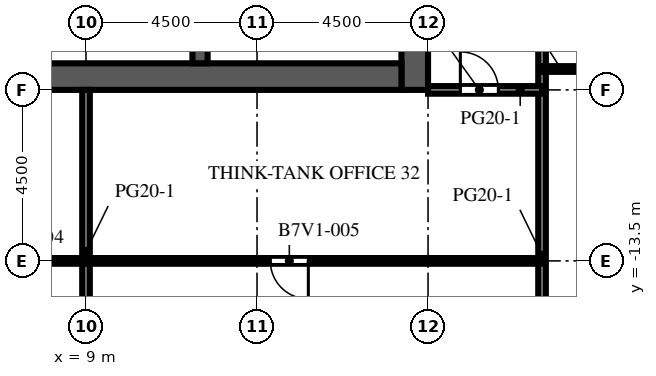
"""IFC4 building model, lengths in metres.
Left out: names, types, materials, properties, quantities, classifications, styles, units other than length and angle.
Written with IfcOpenShell. Run it as: python <this file> out.ifc"""

import sys

from ifc_helpers import new_model, si_unit, direction, frame, frame_2d, origin, place, context, subcontext, project, spatial, rectangle, extrude, element, fill, save


model = new_model("IFC4")
c1 = context("Model", 3, precision=1e-05, world=origin(), true_north=direction((0.0, 1.0)))
c2 = subcontext(c1, "Body", "Model", "MODEL_VIEW")
j1 = project(units=[si_unit("LENGTHUNIT", "METRE"), si_unit("PLANEANGLEUNIT", "RADIAN")], contexts=[c1])
p1 = place(None, origin())
s1 = spatial("IfcSite", under=j1, at=p1, CompositionType="ELEMENT")
p2 = place(p1, origin())
s2 = spatial("IfcBuilding", under=s1, at=p2, CompositionType="ELEMENT")
p3 = place(p2, frame((0.0, 0.0, 243.9)))
s3 = spatial("IfcBuildingStorey", under=s2, at=p3, CompositionType="ELEMENT", Elevation=243.9)
p4 = place(p3, frame((17.65, -9.0, 0.0), z_axis=(0.0, 0.0, 1.0), x_axis=(0.0, 1.0, 0.0)))
e1 = element("IfcWall", 1, at=p4, inside=s3, PredefinedType="SHEAR", context=c2, shape_type="SweptSolid", body=[
    extrude(rectangle(XDim=27.5, YDim=0.7, at=frame_2d((13.75, 0.0))), origin(), (0.0, 0.0, 1.0), 4.1),
])
p5 = place(p4, frame((12.55, 0.0, 0.0)))
e2 = element("IfcOpeningElement", 2, at=p5, cuts=e1, PredefinedType="OPENING", context=c2, shape_type="SweptSolid", body=[
    extrude(rectangle(XDim=2.4, YDim=2.4, at=frame_2d((1.2, 1.2))), frame((0.0, 0.36, 0.0), z_axis=(0.0, -1.0, 0.0), x_axis=(1.0, 0.0, 0.0)), (0.0, 0.0, 1.0), 0.72),
])
p6 = place(p4, frame((6.825, 0.0, 0.0)))
e3 = element("IfcOpeningElement", 3, at=p6, cuts=e1, PredefinedType="OPENING", context=c2, shape_type="SweptSolid", body=[
    extrude(rectangle(XDim=1.2, YDim=2.1, at=frame_2d((0.6, 1.05))), frame((0.0, 0.36, 0.0), z_axis=(0.0, -1.0, 0.0), x_axis=(1.0, 0.0, 0.0)), (0.0, 0.0, 1.0), 0.72),
])
p7 = place(p4, frame((19.475, 0.0, 0.0)))
e4 = element("IfcOpeningElement", 4, at=p7, cuts=e1, PredefinedType="OPENING", context=c2, shape_type="SweptSolid", body=[
    extrude(rectangle(XDim=1.2, YDim=2.1, at=frame_2d((0.6, 1.05))), frame((0.0, 0.36, 0.0), z_axis=(0.0, -1.0, 0.0), x_axis=(1.0, 0.0, 0.0)), (0.0, 0.0, 1.0), 0.72),
])
p8 = place(p3, frame((6.7, -8.65, 0.0), z_axis=(0.0, 0.0, 1.0), x_axis=(1.0, 0.0, 0.0)))
e5 = element("IfcWall", 5, at=p8, inside=s3, PredefinedType="SHEAR", context=c2, shape_type="SweptSolid", body=[
    extrude(rectangle(XDim=10.6, YDim=0.7, at=frame_2d((5.3, 0.0))), origin(), (0.0, 0.0, 1.0), 4.1),
])
p9 = place(p3, frame((12.0, -8.3, 0.0), z_axis=(0.0, 0.0, 1.0), x_axis=(0.0, 1.0, 0.0)))
e6 = element("IfcWall", 6, at=p9, inside=s3, PredefinedType="SHEAR", context=c2, shape_type="SweptSolid", body=[
    extrude(rectangle(XDim=7.6, YDim=0.4, at=frame_2d((3.8, 0.0))), origin(), (0.0, 0.0, 1.0), 4.1),
])
p10 = place(p3, frame((8.2, -8.3, 0.0), z_axis=(0.0, 0.0, 1.0), x_axis=(0.0, 1.0, 0.0)))
e7 = element("IfcWall", 7, at=p10, inside=s3, PredefinedType="PARTITIONING", context=c2, shape_type="SweptSolid", body=[
    extrude(rectangle(XDim=2.584, YDim=0.1, at=frame_2d((1.292, 0.0))), origin(), (0.0, 0.0, 1.0), 3.65),
])
p11 = place(p10, frame((0.792, 0.0, 0.0)))
e8 = element("IfcOpeningElement", 8, at=p11, cuts=e7, PredefinedType="OPENING", context=c2, shape_type="SweptSolid", body=[
    extrude(rectangle(XDim=1.0, YDim=2.1, at=frame_2d((0.5, 1.05))), frame((0.0, 0.06, 0.0), z_axis=(0.0, -1.0, 0.0), x_axis=(1.0, 0.0, 0.0)), (0.0, 0.0, 1.0), 0.12),
])
p12 = place(p3, frame((9.0, -17.5, 0.0), z_axis=(0.0, 0.0, 1.0), x_axis=(0.0, 1.0, 0.0)))
e9 = element("IfcWall", 9, at=p12, inside=s3, PredefinedType="PARTITIONING", context=c2, shape_type="SweptSolid", body=[
    extrude(rectangle(XDim=8.5, YDim=0.2, at=frame_2d((4.25, 0.0))), origin(), (0.0, 0.0, 1.0), 3.65),
])
p13 = place(p3, frame((21.0, 3.25, 0.0), z_axis=(0.0, 0.0, 1.0), x_axis=(0.0, -1.0, 0.0)))
e10 = element("IfcWall", 10, at=p13, inside=s3, PredefinedType="PARTITIONING", context=c2, shape_type="SweptSolid", body=[
    extrude(rectangle(XDim=25.6, YDim=0.2, at=frame_2d((12.8, 0.0))), origin(), (0.0, 0.0, 1.0), 3.65),
])
p14 = place(p13, frame((6.6, 0.0, 0.0)))
e11 = element("IfcOpeningElement", 11, at=p14, cuts=e10, PredefinedType="OPENING", context=c2, shape_type="SweptSolid", body=[
    extrude(rectangle(XDim=1.0, YDim=2.1, at=frame_2d((0.5, 1.05))), frame((0.0, 0.11, 0.0), z_axis=(0.0, -1.0, 0.0), x_axis=(1.0, 0.0, 0.0)), (0.0, 0.0, 1.0), 0.22),
])
p15 = place(p3, frame((21.0, -13.5, 0.0), z_axis=(0.0, 0.0, 1.0), x_axis=(-1.0, 0.0, 0.0)))
e12 = element("IfcWall", 12, at=p15, inside=s3, PredefinedType="PARTITIONING", context=c2, shape_type="SweptSolid", body=[
    extrude(rectangle(XDim=34.5, YDim=0.15, at=frame_2d((17.25, 0.0))), origin(), (0.0, 0.0, 1.0), 3.65),
])
p16 = place(p15, frame((31.65, 0.0, 0.0)))
e13 = element("IfcOpeningElement", 13, at=p16, cuts=e12, PredefinedType="OPENING", context=c2, shape_type="SweptSolid", body=[
    extrude(rectangle(XDim=1.0, YDim=2.1, at=frame_2d((0.5, 1.05))), frame((0.0, 0.085, 0.0), z_axis=(0.0, -1.0, 0.0), x_axis=(1.0, 0.0, 0.0)), (0.0, 0.0, 1.0), 0.17),
])
p17 = place(p15, frame((22.15, 0.0, 0.0)))
e14 = element("IfcOpeningElement", 14, at=p17, cuts=e12, PredefinedType="OPENING", context=c2, shape_type="SweptSolid", body=[
    extrude(rectangle(XDim=1.0, YDim=2.1, at=frame_2d((0.5, 1.05))), frame((0.0, 0.085, 0.0), z_axis=(0.0, -1.0, 0.0), x_axis=(1.0, 0.0, 0.0)), (0.0, 0.0, 1.0), 0.17),
])
p18 = place(p15, frame((13.15, 0.0, 0.0)))
e15 = element("IfcOpeningElement", 15, at=p18, cuts=e12, PredefinedType="OPENING", context=c2, shape_type="SweptSolid", body=[
    extrude(rectangle(XDim=1.0, YDim=2.1, at=frame_2d((0.5, 1.05))), frame((0.0, 0.085, 0.0), z_axis=(0.0, -1.0, 0.0), x_axis=(1.0, 0.0, 0.0)), (0.0, 0.0, 1.0), 0.17),
])
p19 = place(p15, frame((6.15, 0.0, 0.0)))
e16 = element("IfcOpeningElement", 16, at=p19, cuts=e12, PredefinedType="OPENING", context=c2, shape_type="SweptSolid", body=[
    extrude(rectangle(XDim=1.0, YDim=2.1, at=frame_2d((0.5, 1.05))), frame((0.0, 0.085, 0.0), z_axis=(0.0, -1.0, 0.0), x_axis=(1.0, 0.0, 0.0)), (0.0, 0.0, 1.0), 0.17),
])
p20 = place(p3, frame((21.0, -9.0, 0.0), z_axis=(0.0, 0.0, 1.0), x_axis=(-1.0, 0.0, 0.0)))
e17 = element("IfcWall", 17, at=p20, inside=s3, PredefinedType="PARTITIONING", context=c2, shape_type="SweptSolid", body=[
    extrude(rectangle(XDim=3.0, YDim=0.2, at=frame_2d((1.5, 0.0))), origin(), (0.0, 0.0, 1.0), 3.65),
])
p21 = place(p20, frame((1.15, 0.0, 0.0)))
e18 = element("IfcOpeningElement", 18, at=p21, cuts=e17, PredefinedType="OPENING", context=c2, shape_type="SweptSolid", body=[
    extrude(rectangle(XDim=1.0, YDim=2.1, at=frame_2d((0.5, 1.05))), frame((0.0, 0.11, 0.0), z_axis=(0.0, -1.0, 0.0), x_axis=(1.0, 0.0, 0.0)), (0.0, 0.0, 1.0), 0.22),
])
p22 = place(p3, frame((21.0, -8.45, 0.0), z_axis=(0.0, 0.0, 1.0), x_axis=(1.0, 0.0, 0.0)))
e19 = element("IfcWall", 19, at=p22, inside=s3, PredefinedType="PARTITIONING", context=c2, shape_type="SweptSolid", body=[
    extrude(rectangle(XDim=1.0, YDim=0.15, at=frame_2d((0.5, 0.0))), origin(), (0.0, 0.0, 1.0), 3.65),
])
p23 = place(p19, origin())
e20 = element("IfcDoor", 20, at=p23, inside=s3, OperationType="SINGLE_SWING_LEFT", PredefinedType="DOOR", context=c2, shape_type="SweptSolid", body=[
    extrude(rectangle(XDim=1.0, YDim=2.1, at=frame_2d((0.5, 1.05))), frame((0.0, 0.025, 0.0), z_axis=(0.0, -1.0, 0.0), x_axis=(1.0, 0.0, 0.0)), (0.0, 0.0, 1.0), 0.05),
])
fill(e16, e20)
p24 = place(p21, origin())
e21 = element("IfcDoor", 21, at=p24, inside=s3, OperationType="SINGLE_SWING_RIGHT", PredefinedType="DOOR", context=c2, shape_type="SweptSolid", body=[
    extrude(rectangle(XDim=1.0, YDim=2.1, at=frame_2d((0.5, 1.05))), frame((0.0, 0.025, 0.0), z_axis=(0.0, -1.0, 0.0), x_axis=(1.0, 0.0, 0.0)), (0.0, 0.0, 1.0), 0.05),
])
fill(e18, e21)
save(model, sys.argv[1])
